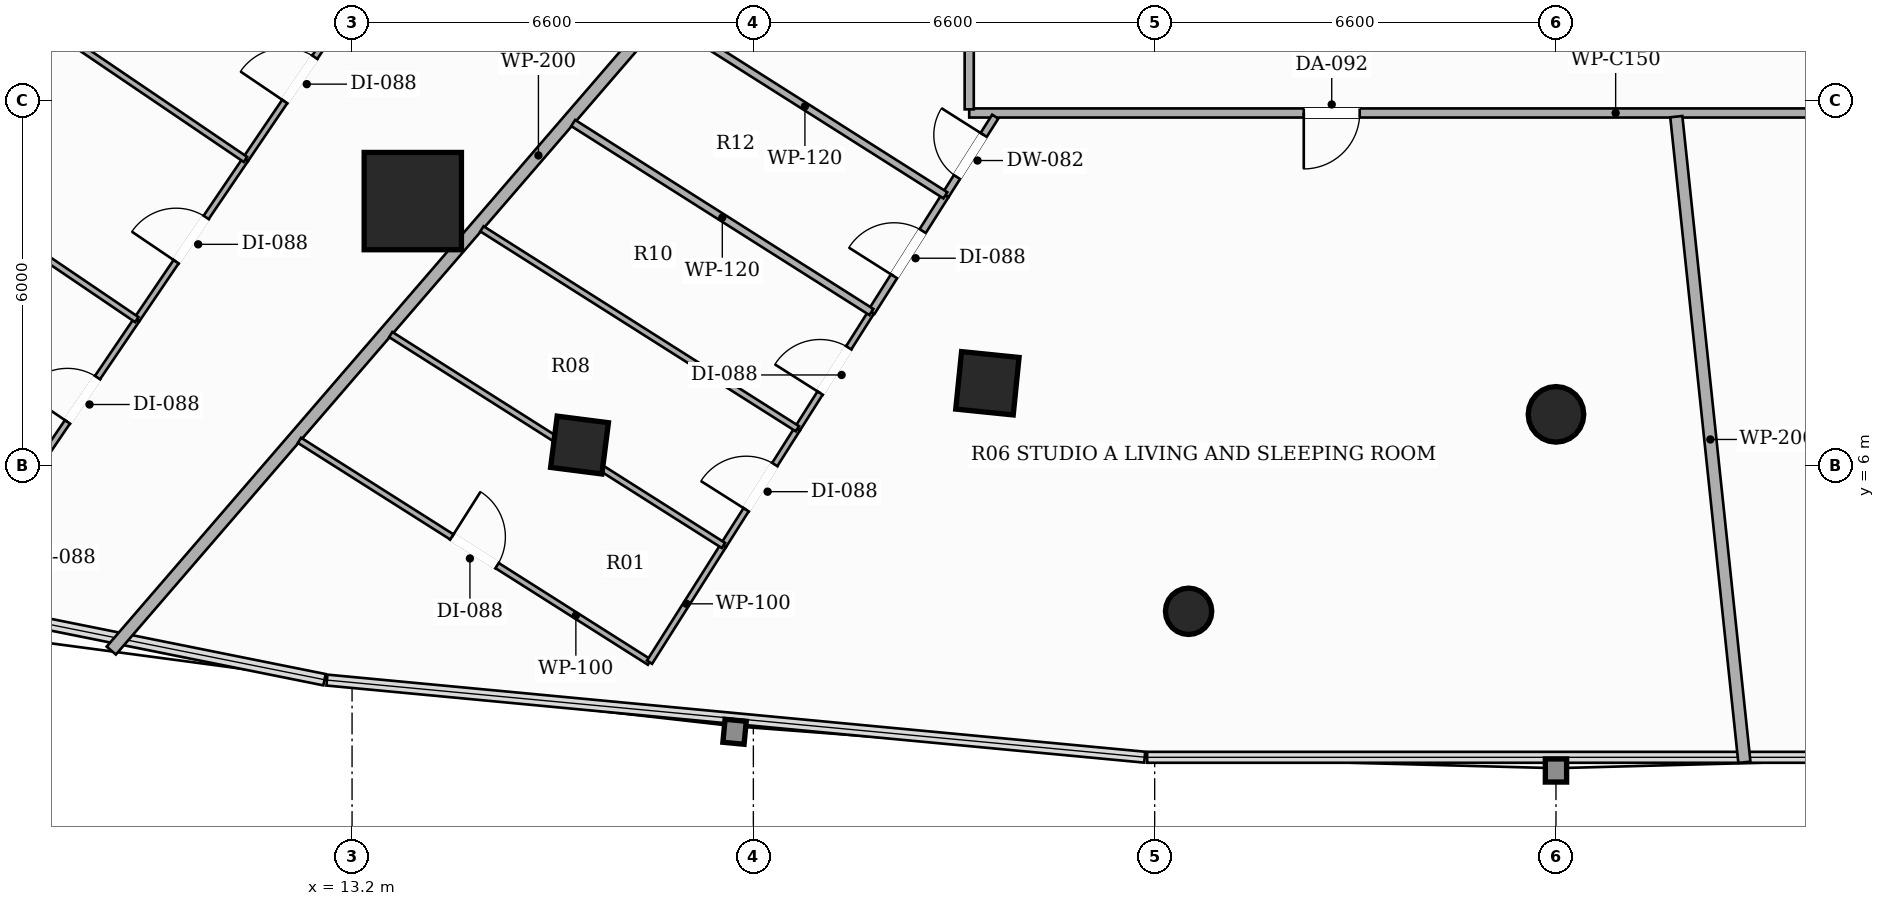
"""IFC4 building model, lengths in metres.
Left out: names, types, materials, properties, quantities, classifications, styles, units other than length and angle.
Written with IfcOpenShell. Run it as: python <this file> out.ifc"""

import sys

from ifc_helpers import new_model, si_unit, direction, frame, frame_2d, origin, origin_2d, place, context, subcontext, project, spatial, rectangle, hollow_rectangle, hollow_circle, extrude, element, fill, save


model = new_model("IFC4")
c1 = context("Model", 3, precision=1e-05, world=origin(), true_north=direction((0.0, 1.0)))
c2 = subcontext(c1, "Body", "Model", "MODEL_VIEW")
j1 = project(units=[si_unit("LENGTHUNIT", "METRE"), si_unit("PLANEANGLEUNIT", "RADIAN")], contexts=[c1])
p1 = place(None, origin())
s1 = spatial("IfcSite", under=j1, at=p1, CompositionType="ELEMENT")
p2 = place(p1, origin())
s2 = spatial("IfcBuilding", under=s1, at=p2, CompositionType="ELEMENT")
p3 = place(p2, frame((0.0, 0.0, 30.2)))
s3 = spatial("IfcBuildingStorey", under=s2, at=p3, CompositionType="ELEMENT", Elevation=30.2)
p4 = place(p3, frame((14.199, 10.351, 0.0), z_axis=(0.0, 0.0, 1.0), x_axis=(1.0, 0.0, 0.0)))
e1 = element("IfcColumn", 1, at=p4, inside=s3, PredefinedType="COLUMN", context=c2, shape_type="SweptSolid", body=[
    extrude(hollow_rectangle(XDim=1.6, YDim=1.6, WallThickness=0.05, at=origin_2d()), origin(), (0.0, 0.0, 1.0), 3.3),
])
p5 = place(p3, frame((23.649, 7.355, 0.0), z_axis=(0.0, 0.0, 1.0), x_axis=(-0.994880708829, 0.101056297183, 0.0)))
e2 = element("IfcColumn", 2, at=p5, inside=s3, PredefinedType="COLUMN", context=c2, shape_type="SweptSolid", body=[
    extrude(hollow_rectangle(XDim=0.95, YDim=0.95, WallThickness=0.032, at=origin_2d()), origin(), (0.0, 0.0, 1.0), 3.3),
])
p6 = place(p3, frame((33.0, 6.844, 0.0), z_axis=(0.0, 0.0, 1.0), x_axis=(1.0, 0.0, 0.0)))
e3 = element("IfcColumn", 3, at=p6, inside=s3, PredefinedType="COLUMN", context=c2, shape_type="SweptSolid", body=[
    extrude(hollow_circle(Radius=0.457, WallThickness=0.025, at=origin_2d()), origin(), (0.0, 0.0, 1.0), 3.3),
])
p7 = place(p3, frame((16.941, 6.339, 0.0), z_axis=(0.0, 0.0, 1.0), x_axis=(-0.99189444259, 0.127064608601, 0.0)))
e4 = element("IfcColumn", 4, at=p7, inside=s3, PredefinedType="COLUMN", context=c2, shape_type="SweptSolid", body=[
    extrude(hollow_rectangle(XDim=0.85, YDim=0.85, WallThickness=0.028, at=origin_2d()), origin(), (0.0, 0.0, 1.0), 3.3),
])
p8 = place(p3, frame((26.958, 3.605, 0.0), z_axis=(0.0, 0.0, 1.0), x_axis=(1.0, 0.0, 0.0)))
e5 = element("IfcColumn", 5, at=p8, inside=s3, PredefinedType="COLUMN", context=c2, shape_type="SweptSolid", body=[
    extrude(hollow_circle(Radius=0.381, WallThickness=0.022, at=origin_2d()), origin(), (0.0, 0.0, 1.0), 3.3),
])
p9 = place(p3, frame((42.59, 11.8, 0.0), z_axis=(0.0, 0.0, 1.0), x_axis=(-1.0, 0.0, 0.0)))
e6 = element("IfcWall", 6, at=p9, inside=s3, PredefinedType="PARTITIONING", context=c2, shape_type="SweptSolid", body=[
    extrude(rectangle(XDim=19.24, YDim=0.15, at=frame_2d((9.62, 0.0))), origin(), (0.0, 0.0, 1.0), 2.669),
])
p10 = place(p9, frame((12.818, 0.0, 0.0)))
e7 = element("IfcOpeningElement", 7, at=p10, cuts=e6, PredefinedType="OPENING", context=c2, shape_type="SweptSolid", body=[
    extrude(rectangle(XDim=0.92, YDim=2.15, at=frame_2d((0.46, 1.075))), frame((0.0, 0.085, 0.0), z_axis=(0.0, -1.0, 0.0), x_axis=(1.0, 0.0, 0.0)), (0.0, 0.0, 1.0), 0.17),
])
p11 = place(p9, frame((3.519, 0.0, 0.0)))
e8 = element("IfcOpeningElement", 8, at=p11, cuts=e6, PredefinedType="OPENING", context=c2, shape_type="SweptSolid", body=[
    extrude(rectangle(XDim=0.88, YDim=2.1, at=frame_2d((0.44, 1.05))), frame((0.0, 0.085, 0.0), z_axis=(0.0, -1.0, 0.0), x_axis=(1.0, 0.0, 0.0)), (0.0, 0.0, 1.0), 0.17),
])
p12 = place(p3, frame((23.35, 11.86, 0.0), z_axis=(0.0, 0.0, 1.0), x_axis=(0.0, 1.0, 0.0)))
e9 = element("IfcWall", 9, at=p12, inside=s3, PredefinedType="PARTITIONING", context=c2, shape_type="SweptSolid", body=[
    extrude(rectangle(XDim=25.04, YDim=0.15, at=frame_2d((12.52, 0.0))), origin(), (0.0, 0.0, 1.0), 2.413),
])
p13 = place(p12, frame((9.872, 0.0, 0.0)))
e10 = element("IfcOpeningElement", 10, at=p13, cuts=e9, PredefinedType="OPENING", context=c2, shape_type="SweptSolid", body=[
    extrude(rectangle(XDim=0.92, YDim=2.15, at=frame_2d((0.46, 1.075))), frame((0.0, 0.085, 0.0), z_axis=(0.0, -1.0, 0.0), x_axis=(1.0, 0.0, 0.0)), (0.0, 0.0, 1.0), 0.17),
])
p14 = place(p12, frame((18.578, 0.0, 0.0)))
e11 = element("IfcOpeningElement", 11, at=p14, cuts=e9, PredefinedType="OPENING", context=c2, shape_type="SweptSolid", body=[
    extrude(rectangle(XDim=0.88, YDim=2.1, at=frame_2d((0.44, 1.05))), frame((0.0, 0.085, 0.0), z_axis=(0.0, -1.0, 0.0), x_axis=(1.0, 0.0, 0.0)), (0.0, 0.0, 1.0), 0.17),
])
p15 = place(p3, frame((9.24, 2.959, 0.0), z_axis=(0.0, 0.0, 1.0), x_axis=(0.653213734957, 0.757173570896, 0.0)))
e12 = element("IfcWall", 12, at=p15, inside=s3, PredefinedType="PARTITIONING", context=c2, shape_type="SweptSolid", body=[
    extrude(rectangle(XDim=21.509, YDim=0.2, at=frame_2d((10.754, 0.0))), origin(), (0.0, 0.0, 1.0), 2.413),
])
p16 = place(p3, frame((34.979, 11.74, 0.0), z_axis=(0.0, 0.0, 1.0), x_axis=(0.104910939681, -0.994481621115, 0.0)))
e13 = element("IfcWall", 13, at=p16, inside=s3, PredefinedType="PARTITIONING", context=c2, shape_type="SweptSolid", body=[
    extrude(rectangle(XDim=10.677, YDim=0.2, at=frame_2d((5.338, 0.0))), origin(), (0.0, 0.0, 1.0), 2.413),
])
p17 = place(p3, frame((22.958, 10.446, 0.0), z_axis=(0.0, 0.0, 1.0), x_axis=(0.535317457649, 0.844650945383, 0.0)))
e14 = element("IfcWall", 14, at=p17, inside=s3, PredefinedType="PARTITIONING", context=c2, shape_type="SweptSolid", body=[
    extrude(rectangle(XDim=1.532, YDim=0.12, at=frame_2d((0.766, 0.0))), origin(), (0.0, 0.0, 1.0), 3.06),
])
p18 = place(p17, frame((0.356, 0.0, 0.0)))
e15 = element("IfcOpeningElement", 15, at=p18, cuts=e14, PredefinedType="OPENING", context=c2, shape_type="SweptSolid", body=[
    extrude(rectangle(XDim=0.82, YDim=2.1, at=frame_2d((0.41, 1.05))), frame((0.0, 0.07, 0.0), z_axis=(0.0, -1.0, 0.0), x_axis=(1.0, 0.0, 0.0)), (0.0, 0.0, 1.0), 0.14),
])
p19 = place(p3, frame((21.741, 8.527, 0.0), z_axis=(0.0, 0.0, 1.0), x_axis=(0.535588747522, 0.844478947948, 0.0)))
e16 = element("IfcWall", 16, at=p19, inside=s3, PredefinedType="PARTITIONING", context=c2, shape_type="SweptSolid", body=[
    extrude(rectangle(XDim=2.272, YDim=0.12, at=frame_2d((1.136, 0.0))), origin(), (0.0, 0.0, 1.0), 3.06),
])
p20 = place(p19, frame((0.696, 0.0, 0.0)))
e17 = element("IfcOpeningElement", 17, at=p20, cuts=e16, PredefinedType="OPENING", context=c2, shape_type="SweptSolid", body=[
    extrude(rectangle(XDim=0.88, YDim=2.1, at=frame_2d((0.44, 1.05))), frame((0.0, 0.07, 0.0), z_axis=(0.0, -1.0, 0.0), x_axis=(1.0, 0.0, 0.0)), (0.0, 0.0, 1.0), 0.14),
])
p21 = place(p3, frame((12.335, 6.417, 0.0), z_axis=(0.0, 0.0, 1.0), x_axis=(0.844634990869, -0.535342630657, 0.0)))
e18 = element("IfcWall", 18, at=p21, inside=s3, PredefinedType="PARTITIONING", context=c2, shape_type="SweptSolid", body=[
    extrude(rectangle(XDim=6.816, YDim=0.1, at=frame_2d((3.408, 0.0))), origin(), (0.0, 0.0, 1.0), 2.619),
])
p22 = place(p21, frame((2.968, 0.0, 0.0)))
e19 = element("IfcOpeningElement", 19, at=p22, cuts=e18, PredefinedType="OPENING", context=c2, shape_type="SweptSolid", body=[
    extrude(rectangle(XDim=0.88, YDim=2.1, at=frame_2d((0.44, 1.05))), frame((0.0, 0.06, 0.0), z_axis=(0.0, -1.0, 0.0), x_axis=(1.0, 0.0, 0.0)), (0.0, 0.0, 1.0), 0.12),
])
p23 = place(p3, frame((18.092, 2.768, 0.0), z_axis=(0.0, 0.0, 1.0), x_axis=(0.535087860904, 0.844796414003, 0.0)))
e20 = element("IfcWall", 20, at=p23, inside=s3, PredefinedType="PARTITIONING", context=c2, shape_type="SweptSolid", body=[
    extrude(rectangle(XDim=2.273, YDim=0.1, at=frame_2d((1.136, 0.0))), origin(), (0.0, 0.0, 1.0), 3.06),
])
p24 = place(p3, frame((19.308, 4.688, 0.0), z_axis=(0.0, 0.0, 1.0), x_axis=(0.535512120593, 0.844527541705, 0.0)))
e21 = element("IfcWall", 21, at=p24, inside=s3, PredefinedType="PARTITIONING", context=c2, shape_type="SweptSolid", body=[
    extrude(rectangle(XDim=2.272, YDim=0.1, at=frame_2d((1.136, 0.0))), origin(), (0.0, 0.0, 1.0), 2.413),
])
p25 = place(p24, frame((0.696, 0.0, 0.0)))
e22 = element("IfcOpeningElement", 22, at=p25, cuts=e21, PredefinedType="OPENING", context=c2, shape_type="SweptSolid", body=[
    extrude(rectangle(XDim=0.88, YDim=2.1, at=frame_2d((0.44, 1.05))), frame((0.0, 0.06, 0.0), z_axis=(0.0, -1.0, 0.0), x_axis=(1.0, 0.0, 0.0)), (0.0, 0.0, 1.0), 0.12),
])
p26 = place(p3, frame((20.525, 6.607, 0.0), z_axis=(0.0, 0.0, 1.0), x_axis=(0.53503930364, 0.844827167864, 0.0)))
e23 = element("IfcWall", 23, at=p26, inside=s3, PredefinedType="PARTITIONING", context=c2, shape_type="SweptSolid", body=[
    extrude(rectangle(XDim=2.273, YDim=0.1, at=frame_2d((1.136, 0.0))), origin(), (0.0, 0.0, 1.0), 2.413),
])
p27 = place(p26, frame((0.696, 0.0, 0.0)))
e24 = element("IfcOpeningElement", 24, at=p27, cuts=e23, PredefinedType="OPENING", context=c2, shape_type="SweptSolid", body=[
    extrude(rectangle(XDim=0.88, YDim=2.1, at=frame_2d((0.44, 1.05))), frame((0.0, 0.06, 0.0), z_axis=(0.0, -1.0, 0.0), x_axis=(1.0, 0.0, 0.0)), (0.0, 0.0, 1.0), 0.12),
])
p28 = place(p3, frame((22.958, 10.446, 0.0), z_axis=(0.0, 0.0, 1.0), x_axis=(-0.844661668189, 0.535300538289, 0.0)))
e25 = element("IfcWall", 25, at=p28, inside=s3, PredefinedType="PARTITIONING", context=c2, shape_type="SweptSolid", body=[
    extrude(rectangle(XDim=5.47, YDim=0.12, at=frame_2d((2.735, 0.0))), origin(), (0.0, 0.0, 1.0), 2.669),
])
p29 = place(p3, frame((21.741, 8.527, 0.0), z_axis=(0.0, 0.0, 1.0), x_axis=(-0.84466254328, 0.535299157463, 0.0)))
e26 = element("IfcWall", 26, at=p29, inside=s3, PredefinedType="PARTITIONING", context=c2, shape_type="SweptSolid", body=[
    extrude(rectangle(XDim=5.806, YDim=0.12, at=frame_2d((2.903, 0.0))), origin(), (0.0, 0.0, 1.0), 2.669),
])
p30 = place(p3, frame((13.836, 8.156, 0.0), z_axis=(0.0, 0.0, 1.0), x_axis=(0.844657780298, -0.535306673023, 0.0)))
e27 = element("IfcWall", 27, at=p30, inside=s3, PredefinedType="PARTITIONING", context=c2, shape_type="SweptSolid", body=[
    extrude(rectangle(XDim=6.479, YDim=0.1, at=frame_2d((3.239, 0.0))), origin(), (0.0, 0.0, 1.0), 2.413),
])
p31 = place(p3, frame((15.336, 9.895, 0.0), z_axis=(0.0, 0.0, 1.0), x_axis=(0.844690904033, -0.535254403666, 0.0)))
e28 = element("IfcWall", 28, at=p31, inside=s3, PredefinedType="PARTITIONING", context=c2, shape_type="SweptSolid", body=[
    extrude(rectangle(XDim=6.143, YDim=0.1, at=frame_2d((3.072, 0.0))), origin(), (0.0, 0.0, 1.0), 2.413),
])
p32 = place(p3, frame((11.447, 11.036, 0.0), z_axis=(0.0, 0.0, 1.0), x_axis=(0.561180574224, 0.827693399221, 0.0)))
e29 = element("IfcWall", 29, at=p32, inside=s3, PredefinedType="PARTITIONING", context=c2, shape_type="SweptSolid", body=[
    extrude(rectangle(XDim=3.182, YDim=0.1, at=frame_2d((1.591, 0.0))), origin(), (0.0, 0.0, 1.0), 2.413),
])
p33 = place(p32, frame((1.151, 0.0, 0.0)))
e30 = element("IfcOpeningElement", 30, at=p33, cuts=e29, PredefinedType="OPENING", context=c2, shape_type="SweptSolid", body=[
    extrude(rectangle(XDim=0.88, YDim=2.1, at=frame_2d((0.44, 1.05))), frame((0.0, 0.06, 0.0), z_axis=(0.0, -1.0, 0.0), x_axis=(1.0, 0.0, 0.0)), (0.0, 0.0, 1.0), 0.12),
])
p34 = place(p3, frame((9.66, 8.402, 0.0), z_axis=(0.0, 0.0, 1.0), x_axis=(0.561478909132, 0.827491048048, 0.0)))
e31 = element("IfcWall", 31, at=p34, inside=s3, PredefinedType="PARTITIONING", context=c2, shape_type="SweptSolid", body=[
    extrude(rectangle(XDim=3.183, YDim=0.1, at=frame_2d((1.591, 0.0))), origin(), (0.0, 0.0, 1.0), 2.619),
])
p35 = place(p34, frame((1.151, 0.0, 0.0)))
e32 = element("IfcOpeningElement", 32, at=p35, cuts=e31, PredefinedType="OPENING", context=c2, shape_type="SweptSolid", body=[
    extrude(rectangle(XDim=0.88, YDim=2.1, at=frame_2d((0.44, 1.05))), frame((0.0, 0.06, 0.0), z_axis=(0.0, -1.0, 0.0), x_axis=(1.0, 0.0, 0.0)), (0.0, 0.0, 1.0), 0.12),
])
p36 = place(p3, frame((7.873, 5.768, 0.0), z_axis=(0.0, 0.0, 1.0), x_axis=(0.561390746336, 0.827550862442, 0.0)))
e33 = element("IfcWall", 33, at=p36, inside=s3, PredefinedType="PARTITIONING", context=c2, shape_type="SweptSolid", body=[
    extrude(rectangle(XDim=3.183, YDim=0.1, at=frame_2d((1.591, 0.0))), origin(), (0.0, 0.0, 1.0), 2.619),
])
p37 = place(p36, frame((1.151, 0.0, 0.0)))
e34 = element("IfcOpeningElement", 34, at=p37, cuts=e33, PredefinedType="OPENING", context=c2, shape_type="SweptSolid", body=[
    extrude(rectangle(XDim=0.88, YDim=2.1, at=frame_2d((0.44, 1.05))), frame((0.0, 0.06, 0.0), z_axis=(0.0, -1.0, 0.0), x_axis=(1.0, 0.0, 0.0)), (0.0, 0.0, 1.0), 0.12),
])
p38 = place(p3, frame((11.447, 11.036, 0.0), z_axis=(0.0, 0.0, 1.0), x_axis=(-0.827600351797, 0.561317786735, 0.0)))
e35 = element("IfcWall", 35, at=p38, inside=s3, PredefinedType="PARTITIONING", context=c2, shape_type="SweptSolid", body=[
    extrude(rectangle(XDim=5.332, YDim=0.1, at=frame_2d((2.666, 0.0))), origin(), (0.0, 0.0, 1.0), 3.06),
])
p39 = place(p3, frame((9.66, 8.402, 0.0), z_axis=(0.0, 0.0, 1.0), x_axis=(-0.827540801305, 0.561405577257, 0.0)))
e36 = element("IfcWall", 36, at=p39, inside=s3, PredefinedType="PARTITIONING", context=c2, shape_type="SweptSolid", body=[
    extrude(rectangle(XDim=4.734, YDim=0.1, at=frame_2d((2.367, 0.0))), origin(), (0.0, 0.0, 1.0), 2.619),
])
p40 = place(p10, origin())
e37 = element("IfcDoor", 37, at=p40, inside=s3, OperationType="SINGLE_SWING_RIGHT", PredefinedType="DOOR", context=c2, shape_type="SweptSolid", body=[
    extrude(rectangle(XDim=0.92, YDim=2.15, at=frame_2d((0.46, 1.075))), frame((0.0, 0.025, 0.0), z_axis=(0.0, -1.0, 0.0), x_axis=(1.0, 0.0, 0.0)), (0.0, 0.0, 1.0), 0.05),
])
fill(e7, e37)
p41 = place(p18, origin())
e38 = element("IfcDoor", 38, at=p41, inside=s3, OperationType="SINGLE_SWING_RIGHT", PredefinedType="DOOR", context=c2, shape_type="SweptSolid", body=[
    extrude(rectangle(XDim=0.82, YDim=2.1, at=frame_2d((0.41, 1.05))), frame((0.0, 0.025, 0.0), z_axis=(0.0, -1.0, 0.0), x_axis=(1.0, 0.0, 0.0)), (0.0, 0.0, 1.0), 0.05),
])
fill(e15, e38)
p42 = place(p20, origin())
e39 = element("IfcDoor", 39, at=p42, inside=s3, OperationType="SINGLE_SWING_LEFT", PredefinedType="DOOR", context=c2, shape_type="SweptSolid", body=[
    extrude(rectangle(XDim=0.88, YDim=2.1, at=frame_2d((0.44, 1.05))), frame((0.0, 0.025, 0.0), z_axis=(0.0, -1.0, 0.0), x_axis=(1.0, 0.0, 0.0)), (0.0, 0.0, 1.0), 0.05),
])
fill(e17, e39)
p43 = place(p22, origin())
e40 = element("IfcDoor", 40, at=p43, inside=s3, OperationType="SINGLE_SWING_LEFT", PredefinedType="DOOR", context=c2, shape_type="SweptSolid", body=[
    extrude(rectangle(XDim=0.88, YDim=2.1, at=frame_2d((0.44, 1.05))), frame((0.0, 0.025, 0.0), z_axis=(0.0, -1.0, 0.0), x_axis=(1.0, 0.0, 0.0)), (0.0, 0.0, 1.0), 0.05),
])
fill(e19, e40)
p44 = place(p25, origin())
e41 = element("IfcDoor", 41, at=p44, inside=s3, OperationType="SINGLE_SWING_LEFT", PredefinedType="DOOR", context=c2, shape_type="SweptSolid", body=[
    extrude(rectangle(XDim=0.88, YDim=2.1, at=frame_2d((0.44, 1.05))), frame((0.0, 0.025, 0.0), z_axis=(0.0, -1.0, 0.0), x_axis=(1.0, 0.0, 0.0)), (0.0, 0.0, 1.0), 0.05),
])
fill(e22, e41)
p45 = place(p27, origin())
e42 = element("IfcDoor", 42, at=p45, inside=s3, OperationType="SINGLE_SWING_LEFT", PredefinedType="DOOR", context=c2, shape_type="SweptSolid", body=[
    extrude(rectangle(XDim=0.88, YDim=2.1, at=frame_2d((0.44, 1.05))), frame((0.0, 0.025, 0.0), z_axis=(0.0, -1.0, 0.0), x_axis=(1.0, 0.0, 0.0)), (0.0, 0.0, 1.0), 0.05),
])
fill(e24, e42)
p46 = place(p33, origin())
e43 = element("IfcDoor", 43, at=p46, inside=s3, OperationType="SINGLE_SWING_LEFT", PredefinedType="DOOR", context=c2, shape_type="SweptSolid", body=[
    extrude(rectangle(XDim=0.88, YDim=2.1, at=frame_2d((0.44, 1.05))), frame((0.0, 0.025, 0.0), z_axis=(0.0, -1.0, 0.0), x_axis=(1.0, 0.0, 0.0)), (0.0, 0.0, 1.0), 0.05),
])
fill(e30, e43)
p47 = place(p35, origin())
e44 = element("IfcDoor", 44, at=p47, inside=s3, OperationType="SINGLE_SWING_LEFT", PredefinedType="DOOR", context=c2, shape_type="SweptSolid", body=[
    extrude(rectangle(XDim=0.88, YDim=2.1, at=frame_2d((0.44, 1.05))), frame((0.0, 0.025, 0.0), z_axis=(0.0, -1.0, 0.0), x_axis=(1.0, 0.0, 0.0)), (0.0, 0.0, 1.0), 0.05),
])
fill(e32, e44)
p48 = place(p37, origin())
e45 = element("IfcDoor", 45, at=p48, inside=s3, OperationType="SINGLE_SWING_LEFT", PredefinedType="DOOR", context=c2, shape_type="SweptSolid", body=[
    extrude(rectangle(XDim=0.88, YDim=2.1, at=frame_2d((0.44, 1.05))), frame((0.0, 0.025, 0.0), z_axis=(0.0, -1.0, 0.0), x_axis=(1.0, 0.0, 0.0)), (0.0, 0.0, 1.0), 0.05),
])
fill(e34, e45)
save(model, sys.argv[1])
